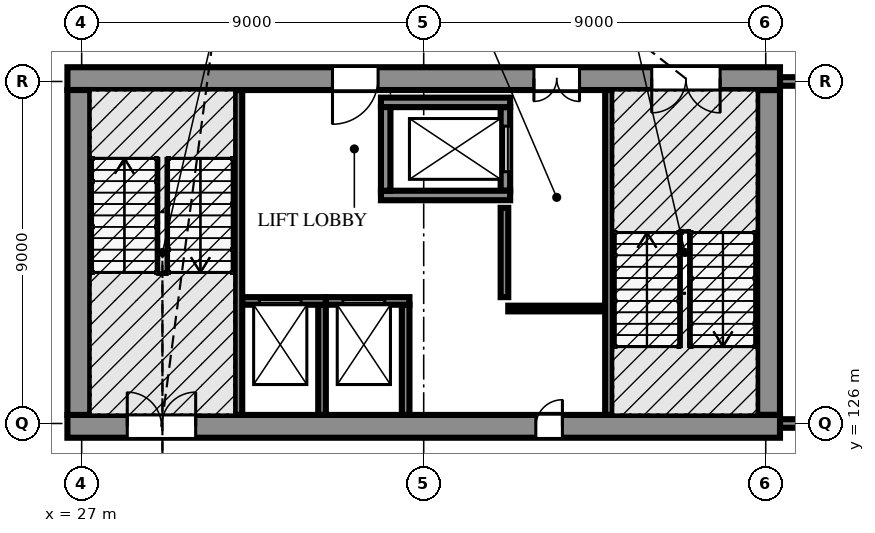
"""IFC4 building model, lengths in metres.
Left out: names, types, materials, properties, quantities, classifications, styles, units other than length and angle.
Written with IfcOpenShell. Run it as: python <this file> out.ifc"""

import sys

from ifc_helpers import new_model, si_unit, direction, frame, frame_2d, origin, place, context, subcontext, project, spatial, polyline, rectangle, outline, extrude, element, fill, save


model = new_model("IFC4")
c1 = context("Model", 3, precision=1e-05, world=origin(), true_north=direction((0.0, 1.0)))
c2 = subcontext(c1, "Body", "Model", "MODEL_VIEW")
j1 = project(units=[si_unit("LENGTHUNIT", "METRE"), si_unit("PLANEANGLEUNIT", "RADIAN")], contexts=[c1])
p1 = place(None, origin())
s1 = spatial("IfcSite", under=j1, at=p1, CompositionType="ELEMENT")
p2 = place(p1, origin())
s2 = spatial("IfcBuilding", under=s1, at=p2, CompositionType="ELEMENT")
p3 = place(p2, origin())
s3 = spatial("IfcBuildingStorey", under=s2, at=p3, CompositionType="ELEMENT", Elevation=0.0)
p4 = place(p3, frame((26.625, 125.925, -2.1), z_axis=(0.0, 0.0, 1.0), x_axis=(1.0, 0.0, 0.0)))
e1 = element("IfcWall", 1, at=p4, inside=s3, PredefinedType="SOLIDWALL", context=c2, shape_type="SweptSolid", body=[
    extrude(rectangle(XDim=18.75, YDim=0.6, at=frame_2d((9.375, 0.0))), origin(), (0.0, 0.0, 1.0), 9.6),
])
p5 = place(p4, frame((1.575, 0.0, 2.1)))
e2 = element("IfcOpeningElement", 2, at=p5, cuts=e1, PredefinedType="OPENING", context=c2, shape_type="SweptSolid", body=[
    extrude(rectangle(XDim=1.8, YDim=2.1, at=frame_2d((0.9, 1.05))), frame((0.0, 0.31, 0.0), z_axis=(0.0, -1.0, 0.0), x_axis=(1.0, 0.0, 0.0)), (0.0, 0.0, 1.0), 0.62),
])
p6 = place(p4, frame((12.325, 0.0, 2.1)))
e3 = element("IfcOpeningElement", 3, at=p6, cuts=e1, PredefinedType="OPENING", context=c2, shape_type="SweptSolid", body=[
    extrude(rectangle(XDim=0.7, YDim=2.0, at=frame_2d((0.35, 1.0))), frame((0.0, 0.31, 0.0), z_axis=(0.0, -1.0, 0.0), x_axis=(1.0, 0.0, 0.0)), (0.0, 0.0, 1.0), 0.62),
])
p7 = place(p3, frame((26.625, 135.075, -2.1), z_axis=(0.0, 0.0, 1.0), x_axis=(1.0, 0.0, 0.0)))
e4 = element("IfcWall", 4, at=p7, inside=s3, PredefinedType="SOLIDWALL", context=c2, shape_type="SweptSolid", body=[
    extrude(rectangle(XDim=18.75, YDim=0.6, at=frame_2d((9.375, 0.0))), origin(), (0.0, 0.0, 1.0), 9.6),
])
p8 = place(p7, frame((15.375, 0.0, 2.1)))
e5 = element("IfcOpeningElement", 5, at=p8, cuts=e4, PredefinedType="OPENING", context=c2, shape_type="SweptSolid", body=[
    extrude(rectangle(XDim=1.8, YDim=2.1, at=frame_2d((0.9, 1.05))), frame((0.0, 0.31, 0.0), z_axis=(0.0, -1.0, 0.0), x_axis=(1.0, 0.0, 0.0)), (0.0, 0.0, 1.0), 0.62),
])
p9 = place(p7, frame((6.975, 0.0, 2.1)))
e6 = element("IfcOpeningElement", 6, at=p9, cuts=e4, PredefinedType="OPENING", context=c2, shape_type="SweptSolid", body=[
    extrude(rectangle(XDim=1.2, YDim=2.1, at=frame_2d((0.6, 1.05))), frame((0.0, 0.31, 0.0), z_axis=(0.0, -1.0, 0.0), x_axis=(1.0, 0.0, 0.0)), (0.0, 0.0, 1.0), 0.62),
])
p10 = place(p7, frame((12.275, 0.0, 2.1)))
e7 = element("IfcOpeningElement", 7, at=p10, cuts=e4, PredefinedType="OPENING", context=c2, shape_type="SweptSolid", body=[
    extrude(rectangle(XDim=1.2, YDim=2.1, at=frame_2d((0.6, 1.05))), frame((0.0, 0.31, 0.0), z_axis=(0.0, -1.0, 0.0), x_axis=(1.0, 0.0, 0.0)), (0.0, 0.0, 1.0), 0.62),
])
for number, where, z_axis, x_axis in (
    (8, (26.925, 126.225, -2.1), (0.0, 0.0, 1.0), (0.0, 1.0, 0.0)),
    (9, (45.075, 126.225, -2.1), (0.0, 0.0, 1.0), (0.0, 1.0, 0.0)),
):
    element("IfcWall", number, at=place(p3, frame(where, z_axis=z_axis, x_axis=x_axis)), inside=s3, PredefinedType="SOLIDWALL", context=c2, shape_type="SweptSolid", body=[
        extrude(rectangle(XDim=8.55, YDim=0.6, at=frame_2d((4.275, 0.0))), origin(), (0.0, 0.0, 1.0), 9.6),
    ])
for number, where, z_axis, x_axis in (
    (10, (31.125, 126.227, 0.0), (0.0, 0.0, 1.0), (0.0, 1.0, 0.0)),
    (11, (40.875, 126.227, 0.0), (0.0, 0.0, 1.0), (0.0, 1.0, 0.0)),
):
    element("IfcWall", number, at=place(p3, frame(where, z_axis=z_axis, x_axis=x_axis)), inside=s3, PredefinedType="SOLIDWALL", context=c2, shape_type="SweptSolid", body=[
        extrude(rectangle(XDim=8.546, YDim=0.2, at=frame_2d((4.273, 0.0))), origin(), (0.0, 0.0, 1.0), 6.836),
    ])
p11 = place(p3, frame((31.227, 129.225, -1.6), z_axis=(0.0, 0.0, 1.0), x_axis=(1.0, 0.0, 0.0)))
e12 = element("IfcWall", 12, at=p11, inside=s3, PredefinedType="SOLIDWALL", context=c2, shape_type="SweptSolid", body=[
    extrude(rectangle(XDim=2.198, YDim=0.2, at=frame_2d((1.099, 0.0))), origin(), (0.0, 0.0, 1.0), 8.357),
])
p12 = place(p11, frame((0.448, 0.0, 1.6)))
e13 = element("IfcOpeningElement", 13, at=p12, cuts=e12, PredefinedType="OPENING", context=c2, shape_type="SweptSolid", body=[
    extrude(rectangle(XDim=1.1, YDim=2.1, at=frame_2d((0.55, 1.05))), frame((0.0, 0.11, 0.0), z_axis=(0.0, -1.0, 0.0), x_axis=(1.0, 0.0, 0.0)), (0.0, 0.0, 1.0), 0.22),
])
p13 = place(p3, frame((33.325, 126.227, -1.6), z_axis=(0.0, 0.0, 1.0), x_axis=(0.0, 1.0, 0.0)))
e14 = element("IfcWall", 14, at=p13, inside=s3, PredefinedType="SOLIDWALL", context=c2, shape_type="SweptSolid", body=[
    extrude(rectangle(XDim=2.898, YDim=0.2, at=frame_2d((1.449, 0.0))), origin(), (0.0, 0.0, 1.0), 8.357),
])
p14 = place(p3, frame((33.427, 129.225, -1.6), z_axis=(0.0, 0.0, 1.0), x_axis=(1.0, 0.0, 0.0)))
e15 = element("IfcWall", 15, at=p14, inside=s3, PredefinedType="SOLIDWALL", context=c2, shape_type="SweptSolid", body=[
    extrude(rectangle(XDim=2.198, YDim=0.2, at=frame_2d((1.099, 0.0))), origin(), (0.0, 0.0, 1.0), 8.357),
])
p15 = place(p14, frame((0.448, 0.0, 1.6)))
e16 = element("IfcOpeningElement", 16, at=p15, cuts=e15, PredefinedType="OPENING", context=c2, shape_type="SweptSolid", body=[
    extrude(rectangle(XDim=1.1, YDim=2.1, at=frame_2d((0.55, 1.05))), frame((0.0, 0.11, 0.0), z_axis=(0.0, -1.0, 0.0), x_axis=(1.0, 0.0, 0.0)), (0.0, 0.0, 1.0), 0.22),
])
p16 = place(p3, frame((35.525, 126.227, -1.6), z_axis=(0.0, 0.0, 1.0), x_axis=(0.0, 1.0, 0.0)))
e17 = element("IfcWall", 17, at=p16, inside=s3, PredefinedType="SOLIDWALL", context=c2, shape_type="SweptSolid", body=[
    extrude(rectangle(XDim=2.898, YDim=0.2, at=frame_2d((1.449, 0.0))), origin(), (0.0, 0.0, 1.0), 8.357),
])
for number, where, z_axis, x_axis in (
    (18, (34.875, 132.0, -1.6), (0.0, 0.0, 1.0), (1.0, 0.0, 0.0)),
    (19, (34.875, 134.45, -1.6), (0.0, 0.0, 1.0), (1.0, 0.0, 0.0)),
):
    element("IfcWall", number, at=place(p3, frame(where, z_axis=z_axis, x_axis=x_axis)), inside=s3, PredefinedType="SOLIDWALL", context=c2, shape_type="SweptSolid", body=[
        extrude(rectangle(XDim=3.4, YDim=0.25, at=frame_2d((1.7, 0.0))), origin(), (0.0, 0.0, 1.0), 8.436),
    ])
p17 = place(p3, frame((35.0, 132.125, -1.6), z_axis=(0.0, 0.0, 1.0), x_axis=(0.0, 1.0, 0.0)))
e20 = element("IfcWall", 20, at=p17, inside=s3, PredefinedType="SOLIDWALL", context=c2, shape_type="SweptSolid", body=[
    extrude(rectangle(XDim=2.2, YDim=0.25, at=frame_2d((1.1, 0.0))), origin(), (0.0, 0.0, 1.0), 8.436),
])
p18 = place(p3, frame((38.15, 132.125, -1.6), z_axis=(0.0, 0.0, 1.0), x_axis=(0.0, 1.0, 0.0)))
e21 = element("IfcWall", 21, at=p18, inside=s3, PredefinedType="SOLIDWALL", context=c2, shape_type="SweptSolid", body=[
    extrude(rectangle(XDim=2.2, YDim=0.25, at=frame_2d((1.1, 0.0))), origin(), (0.0, 0.0, 1.0), 8.436),
])
p19 = place(p18, frame((0.5, 0.0, 1.6)))
e22 = element("IfcOpeningElement", 22, at=p19, cuts=e21, PredefinedType="OPENING", context=c2, shape_type="SweptSolid", body=[
    extrude(rectangle(XDim=1.2, YDim=2.1, at=frame_2d((0.6, 1.05))), frame((0.0, 0.135, 0.0), z_axis=(0.0, -1.0, 0.0), x_axis=(1.0, 0.0, 0.0)), (0.0, 0.0, 1.0), 0.27),
])
p20 = place(p3, frame((51.0, 135.0, 0.0), z_axis=(0.0, 0.0, 1.0), x_axis=(-1.0, 0.0, 0.0)))
e23 = element("IfcWall", 23, at=p20, inside=s3, PredefinedType="PARTITIONING", context=c2, shape_type="SweptSolid", body=[
    extrude(rectangle(XDim=5.623, YDim=0.225, at=frame_2d((2.812, 0.0))), origin(), (0.0, 0.0, 1.0), 6.6),
])
p21 = place(p20, frame((2.4, 0.0, 0.0)))
e24 = element("IfcOpeningElement", 24, at=p21, cuts=e23, PredefinedType="OPENING", context=c2, shape_type="SweptSolid", body=[
    extrude(rectangle(XDim=1.2, YDim=2.4, at=frame_2d((0.6, 1.2))), frame((0.0, 0.123, 0.0), z_axis=(0.0, -1.0, 0.0), x_axis=(1.0, 0.0, 0.0)), (0.0, 0.0, 1.0), 0.245),
])
p22 = place(p3, frame((45.377, 126.0, 0.0), z_axis=(0.0, 0.0, 1.0), x_axis=(1.0, 0.0, 0.0)))
e25 = element("IfcWall", 25, at=p22, inside=s3, PredefinedType="PARTITIONING", context=c2, shape_type="SweptSolid", body=[
    extrude(rectangle(XDim=5.623, YDim=0.225, at=frame_2d((2.812, 0.0))), origin(), (0.0, 0.0, 1.0), 6.6),
])
p23 = place(p3, frame((38.125, 131.675, 0.0), z_axis=(0.0, 0.0, 1.0), x_axis=(0.0, -1.0, 0.0)))
e26 = element("IfcWall", 26, at=p23, inside=s3, PredefinedType="PARTITIONING", context=c2, shape_type="SweptSolid", body=[
    extrude(rectangle(XDim=2.35, YDim=0.2, at=frame_2d((1.175, 0.0))), origin(), (0.0, 0.0, 1.0), 6.6),
])
p24 = place(p3, frame((40.773, 129.025, 0.0), z_axis=(0.0, 0.0, 1.0), x_axis=(-1.0, 0.0, 0.0)))
e27 = element("IfcWall", 27, at=p24, inside=s3, PredefinedType="SOLIDWALL", context=c2, shape_type="SweptSolid", body=[
    extrude(rectangle(XDim=2.548, YDim=0.15, at=frame_2d((1.274, 0.0))), origin(), (0.0, 0.0, 1.0), 6.836),
])
p25 = place(p12, origin())
e28 = element("IfcDoor", 28, at=p25, inside=s3, OperationType="SLIDING_TO_LEFT", PredefinedType="DOOR", context=c2, shape_type="SweptSolid", body=[
    extrude(outline(polyline([(0.0, 0.0), (0.07, 0.0), (0.07, 2.03), (1.03, 2.03), (1.03, 0.0), (1.1, 0.0), (1.1, 2.1), (0.0, 2.1), (0.0, 0.0)])), frame((0.0, 0.025, 0.0), z_axis=(0.0, -1.0, 0.0), x_axis=(1.0, 0.0, 0.0)), (0.0, 0.0, 1.0), 0.05),
    extrude(rectangle(XDim=0.524, YDim=2.016, at=frame_2d((0.336, 1.018))), frame((0.0, 0.018, 0.0), z_axis=(0.0, -1.0, 0.0), x_axis=(1.0, 0.0, 0.0)), (0.0, 0.0, 1.0), 0.016),
    extrude(rectangle(XDim=0.52, YDim=2.016, at=frame_2d((0.766, 1.018))), frame((0.0, -0.002, 0.0), z_axis=(0.0, -1.0, 0.0), x_axis=(1.0, 0.0, 0.0)), (0.0, 0.0, 1.0), 0.016),
])
fill(e13, e28)
p26 = place(p15, origin())
e29 = element("IfcDoor", 29, at=p26, inside=s3, OperationType="SLIDING_TO_LEFT", PredefinedType="DOOR", context=c2, shape_type="SweptSolid", body=[
    extrude(outline(polyline([(0.0, 0.0), (0.07, 0.0), (0.07, 2.03), (1.03, 2.03), (1.03, 0.0), (1.1, 0.0), (1.1, 2.1), (0.0, 2.1), (0.0, 0.0)])), frame((0.0, 0.025, 0.0), z_axis=(0.0, -1.0, 0.0), x_axis=(1.0, 0.0, 0.0)), (0.0, 0.0, 1.0), 0.05),
    extrude(rectangle(XDim=0.524, YDim=2.016, at=frame_2d((0.336, 1.018))), frame((0.0, 0.018, 0.0), z_axis=(0.0, -1.0, 0.0), x_axis=(1.0, 0.0, 0.0)), (0.0, 0.0, 1.0), 0.016),
    extrude(rectangle(XDim=0.52, YDim=2.016, at=frame_2d((0.766, 1.018))), frame((0.0, -0.002, 0.0), z_axis=(0.0, -1.0, 0.0), x_axis=(1.0, 0.0, 0.0)), (0.0, 0.0, 1.0), 0.016),
])
fill(e16, e29)
p27 = place(p19, origin())
e30 = element("IfcDoor", 30, at=p27, inside=s3, OperationType="SLIDING_TO_LEFT", PredefinedType="DOOR", context=c2, shape_type="SweptSolid", body=[
    extrude(outline(polyline([(0.0, 0.0), (0.07, 0.0), (0.07, 2.03), (1.13, 2.03), (1.13, 0.0), (1.2, 0.0), (1.2, 2.1), (0.0, 2.1), (0.0, 0.0)])), frame((0.0, 0.025, 0.0), z_axis=(0.0, -1.0, 0.0), x_axis=(1.0, 0.0, 0.0)), (0.0, 0.0, 1.0), 0.05),
    extrude(rectangle(XDim=0.579, YDim=2.016, at=frame_2d((0.363, 1.018))), frame((0.0, 0.018, 0.0), z_axis=(0.0, -1.0, 0.0), x_axis=(1.0, 0.0, 0.0)), (0.0, 0.0, 1.0), 0.016),
    extrude(rectangle(XDim=0.575, YDim=2.016, at=frame_2d((0.839, 1.018))), frame((0.0, -0.002, 0.0), z_axis=(0.0, -1.0, 0.0), x_axis=(1.0, 0.0, 0.0)), (0.0, 0.0, 1.0), 0.016),
])
fill(e22, e30)
p28 = place(p5, origin())
e31 = element("IfcDoor", 31, at=p28, inside=s3, OperationType="DOUBLE_DOOR_SINGLE_SWING", PredefinedType="DOOR", context=c2, shape_type="SweptSolid", body=[
    extrude(outline(polyline([(0.0, 0.0), (0.07, 0.0), (0.07, 2.03), (1.73, 2.03), (1.73, 0.0), (1.8, 0.0), (1.8, 2.1), (0.0, 2.1), (0.0, 0.0)])), frame((0.0, 0.025, 0.0), z_axis=(0.0, -1.0, 0.0), x_axis=(1.0, 0.0, 0.0)), (0.0, 0.0, 1.0), 0.05),
    extrude(outline(polyline([(0.074, 0.01), (0.897, 0.01), (0.897, 2.026), (0.074, 2.026), (0.074, 0.01)]), holes=[polyline([(0.194, 0.16), (0.777, 0.16), (0.777, 1.01), (0.194, 1.01), (0.194, 0.16)]), polyline([(0.335, 1.16), (0.635, 1.16), (0.635, 1.76), (0.335, 1.76), (0.335, 1.16)])]), frame((0.0, 0.017, 0.0), z_axis=(0.0, -1.0, 0.0), x_axis=(1.0, 0.0, 0.0)), (0.0, 0.0, 1.0), 0.035),
    extrude(rectangle(XDim=0.583, YDim=0.85, at=frame_2d((0.485, 0.585))), frame((0.0, 0.009, 0.0), z_axis=(0.0, -1.0, 0.0), x_axis=(1.0, 0.0, 0.0)), (0.0, 0.0, 1.0), 0.017),
    extrude(rectangle(XDim=0.3, YDim=0.6, at=frame_2d((0.485, 1.46))), frame((0.0, 0.006, 0.0), z_axis=(0.0, -1.0, 0.0), x_axis=(1.0, 0.0, 0.0)), (0.0, 0.0, 1.0), 0.012),
    extrude(outline(polyline([(0.903, 0.01), (1.726, 0.01), (1.726, 2.026), (0.903, 2.026), (0.903, 0.01)]), holes=[polyline([(1.023, 0.16), (1.606, 0.16), (1.606, 1.01), (1.023, 1.01), (1.023, 0.16)]), polyline([(1.165, 1.16), (1.465, 1.16), (1.465, 1.76), (1.165, 1.76), (1.165, 1.16)])]), frame((0.0, 0.017, 0.0), z_axis=(0.0, -1.0, 0.0), x_axis=(1.0, 0.0, 0.0)), (0.0, 0.0, 1.0), 0.035),
    extrude(rectangle(XDim=0.583, YDim=0.85, at=frame_2d((1.314, 0.585))), frame((0.0, 0.009, 0.0), z_axis=(0.0, -1.0, 0.0), x_axis=(1.0, 0.0, 0.0)), (0.0, 0.0, 1.0), 0.017),
    extrude(rectangle(XDim=0.3, YDim=0.6, at=frame_2d((1.314, 1.46))), frame((0.0, 0.006, 0.0), z_axis=(0.0, -1.0, 0.0), x_axis=(1.0, 0.0, 0.0)), (0.0, 0.0, 1.0), 0.012),
])
fill(e2, e31)
p29 = place(p8, frame((1.8, 0.0, 0.0), z_axis=(0.0, 0.0, 1.0), x_axis=(-1.0, 0.0, 0.0)))
e32 = element("IfcDoor", 32, at=p29, inside=s3, OperationType="DOUBLE_DOOR_SINGLE_SWING", PredefinedType="DOOR", context=c2, shape_type="SweptSolid", body=[
    extrude(outline(polyline([(0.0, 0.0), (0.07, 0.0), (0.07, 2.03), (1.73, 2.03), (1.73, 0.0), (1.8, 0.0), (1.8, 2.1), (0.0, 2.1), (0.0, 0.0)])), frame((0.0, 0.025, 0.0), z_axis=(0.0, -1.0, 0.0), x_axis=(1.0, 0.0, 0.0)), (0.0, 0.0, 1.0), 0.05),
    extrude(outline(polyline([(0.074, 0.01), (0.897, 0.01), (0.897, 2.026), (0.074, 2.026), (0.074, 0.01)]), holes=[polyline([(0.194, 0.16), (0.777, 0.16), (0.777, 1.01), (0.194, 1.01), (0.194, 0.16)]), polyline([(0.335, 1.16), (0.635, 1.16), (0.635, 1.76), (0.335, 1.76), (0.335, 1.16)])]), frame((0.0, 0.017, 0.0), z_axis=(0.0, -1.0, 0.0), x_axis=(1.0, 0.0, 0.0)), (0.0, 0.0, 1.0), 0.035),
    extrude(rectangle(XDim=0.583, YDim=0.85, at=frame_2d((0.485, 0.585))), frame((0.0, 0.009, 0.0), z_axis=(0.0, -1.0, 0.0), x_axis=(1.0, 0.0, 0.0)), (0.0, 0.0, 1.0), 0.017),
    extrude(rectangle(XDim=0.3, YDim=0.6, at=frame_2d((0.485, 1.46))), frame((0.0, 0.006, 0.0), z_axis=(0.0, -1.0, 0.0), x_axis=(1.0, 0.0, 0.0)), (0.0, 0.0, 1.0), 0.012),
    extrude(outline(polyline([(0.903, 0.01), (1.726, 0.01), (1.726, 2.026), (0.903, 2.026), (0.903, 0.01)]), holes=[polyline([(1.023, 0.16), (1.606, 0.16), (1.606, 1.01), (1.023, 1.01), (1.023, 0.16)]), polyline([(1.165, 1.16), (1.465, 1.16), (1.465, 1.76), (1.165, 1.76), (1.165, 1.16)])]), frame((0.0, 0.017, 0.0), z_axis=(0.0, -1.0, 0.0), x_axis=(1.0, 0.0, 0.0)), (0.0, 0.0, 1.0), 0.035),
    extrude(rectangle(XDim=0.583, YDim=0.85, at=frame_2d((1.314, 0.585))), frame((0.0, 0.009, 0.0), z_axis=(0.0, -1.0, 0.0), x_axis=(1.0, 0.0, 0.0)), (0.0, 0.0, 1.0), 0.017),
    extrude(rectangle(XDim=0.3, YDim=0.6, at=frame_2d((1.314, 1.46))), frame((0.0, 0.006, 0.0), z_axis=(0.0, -1.0, 0.0), x_axis=(1.0, 0.0, 0.0)), (0.0, 0.0, 1.0), 0.012),
])
fill(e5, e32)
p30 = place(p9, frame((1.2, 0.0, 0.0), z_axis=(0.0, 0.0, 1.0), x_axis=(-1.0, 0.0, 0.0)))
e33 = element("IfcDoor", 33, at=p30, inside=s3, OperationType="DOUBLE_DOOR_SINGLE_SWING", PredefinedType="DOOR", context=c2, shape_type="SweptSolid", body=[
    extrude(outline(polyline([(0.0, 0.0), (0.07, 0.0), (0.07, 2.03), (1.13, 2.03), (1.13, 0.0), (1.2, 0.0), (1.2, 2.1), (0.0, 2.1), (0.0, 0.0)])), frame((0.0, 0.025, 0.0), z_axis=(0.0, -1.0, 0.0), x_axis=(1.0, 0.0, 0.0)), (0.0, 0.0, 1.0), 0.05),
    extrude(outline(polyline([(0.074, 0.01), (0.597, 0.01), (0.597, 2.026), (0.074, 2.026), (0.074, 0.01)]), holes=[polyline([(0.178, 0.373), (0.492, 0.373), (0.492, 1.784), (0.178, 1.784), (0.178, 0.373)])]), frame((0.0, 0.017, 0.0), z_axis=(0.0, -1.0, 0.0), x_axis=(1.0, 0.0, 0.0)), (0.0, 0.0, 1.0), 0.035),
    extrude(rectangle(XDim=0.314, YDim=1.411, at=frame_2d((0.335, 1.079))), frame((0.0, 0.009, 0.0), z_axis=(0.0, -1.0, 0.0), x_axis=(1.0, 0.0, 0.0)), (0.0, 0.0, 1.0), 0.017),
    extrude(outline(polyline([(0.603, 0.01), (1.126, 0.01), (1.126, 2.026), (0.603, 2.026), (0.603, 0.01)]), holes=[polyline([(0.708, 0.373), (1.021, 0.373), (1.021, 1.784), (0.708, 1.784), (0.708, 0.373)])]), frame((0.0, 0.017, 0.0), z_axis=(0.0, -1.0, 0.0), x_axis=(1.0, 0.0, 0.0)), (0.0, 0.0, 1.0), 0.035),
    extrude(rectangle(XDim=0.314, YDim=1.411, at=frame_2d((0.865, 1.079))), frame((0.0, 0.009, 0.0), z_axis=(0.0, -1.0, 0.0), x_axis=(1.0, 0.0, 0.0)), (0.0, 0.0, 1.0), 0.017),
])
fill(e6, e33)
p31 = place(p10, frame((1.2, 0.0, 0.0), z_axis=(0.0, 0.0, 1.0), x_axis=(-1.0, 0.0, 0.0)))
e34 = element("IfcDoor", 34, at=p31, inside=s3, OperationType="DOUBLE_DOOR_SINGLE_SWING", PredefinedType="DOOR", context=c2, shape_type="SweptSolid", body=[
    extrude(outline(polyline([(0.0, 0.0), (0.07, 0.0), (0.07, 2.03), (1.13, 2.03), (1.13, 0.0), (1.2, 0.0), (1.2, 2.1), (0.0, 2.1), (0.0, 0.0)])), frame((0.0, 0.025, 0.0), z_axis=(0.0, -1.0, 0.0), x_axis=(1.0, 0.0, 0.0)), (0.0, 0.0, 1.0), 0.05),
    extrude(outline(polyline([(0.074, 0.01), (0.597, 0.01), (0.597, 2.026), (0.074, 2.026), (0.074, 0.01)]), holes=[polyline([(0.178, 0.373), (0.492, 0.373), (0.492, 1.784), (0.178, 1.784), (0.178, 0.373)])]), frame((0.0, 0.017, 0.0), z_axis=(0.0, -1.0, 0.0), x_axis=(1.0, 0.0, 0.0)), (0.0, 0.0, 1.0), 0.035),
    extrude(rectangle(XDim=0.314, YDim=1.411, at=frame_2d((0.335, 1.079))), frame((0.0, 0.009, 0.0), z_axis=(0.0, -1.0, 0.0), x_axis=(1.0, 0.0, 0.0)), (0.0, 0.0, 1.0), 0.017),
    extrude(outline(polyline([(0.603, 0.01), (1.126, 0.01), (1.126, 2.026), (0.603, 2.026), (0.603, 0.01)]), holes=[polyline([(0.708, 0.373), (1.021, 0.373), (1.021, 1.784), (0.708, 1.784), (0.708, 0.373)])]), frame((0.0, 0.017, 0.0), z_axis=(0.0, -1.0, 0.0), x_axis=(1.0, 0.0, 0.0)), (0.0, 0.0, 1.0), 0.035),
    extrude(rectangle(XDim=0.314, YDim=1.411, at=frame_2d((0.865, 1.079))), frame((0.0, 0.009, 0.0), z_axis=(0.0, -1.0, 0.0), x_axis=(1.0, 0.0, 0.0)), (0.0, 0.0, 1.0), 0.017),
])
fill(e7, e34)
p32 = place(p6, origin())
e35 = element("IfcDoor", 35, at=p32, inside=s3, OperationType="SINGLE_SWING_RIGHT", PredefinedType="DOOR", context=c2, shape_type="SweptSolid", body=[
    extrude(outline(polyline([(0.0, 0.0), (0.07, 0.0), (0.07, 1.93), (0.63, 1.93), (0.63, 0.0), (0.7, 0.0), (0.7, 2.0), (0.0, 2.0), (0.0, 0.0)])), frame((0.0, 0.025, 0.0), z_axis=(0.0, -1.0, 0.0), x_axis=(1.0, 0.0, 0.0)), (0.0, 0.0, 1.0), 0.05),
    extrude(outline(polyline([(0.074, 0.01), (0.626, 0.01), (0.626, 1.926), (0.074, 1.926), (0.074, 0.01)]), holes=[polyline([(0.184, 0.16), (0.516, 0.16), (0.516, 1.01), (0.184, 1.01), (0.184, 0.16)]), polyline([(0.2, 1.16), (0.5, 1.16), (0.5, 1.76), (0.2, 1.76), (0.2, 1.16)])]), frame((0.0, 0.017, 0.0), z_axis=(0.0, -1.0, 0.0), x_axis=(1.0, 0.0, 0.0)), (0.0, 0.0, 1.0), 0.035),
    extrude(rectangle(XDim=0.331, YDim=0.85, at=frame_2d((0.35, 0.585))), frame((0.0, 0.009, 0.0), z_axis=(0.0, -1.0, 0.0), x_axis=(1.0, 0.0, 0.0)), (0.0, 0.0, 1.0), 0.017),
    extrude(rectangle(XDim=0.3, YDim=0.6, at=frame_2d((0.35, 1.46))), frame((0.0, 0.006, 0.0), z_axis=(0.0, -1.0, 0.0), x_axis=(1.0, 0.0, 0.0)), (0.0, 0.0, 1.0), 0.012),
])
fill(e3, e35)
save(model, sys.argv[1])
